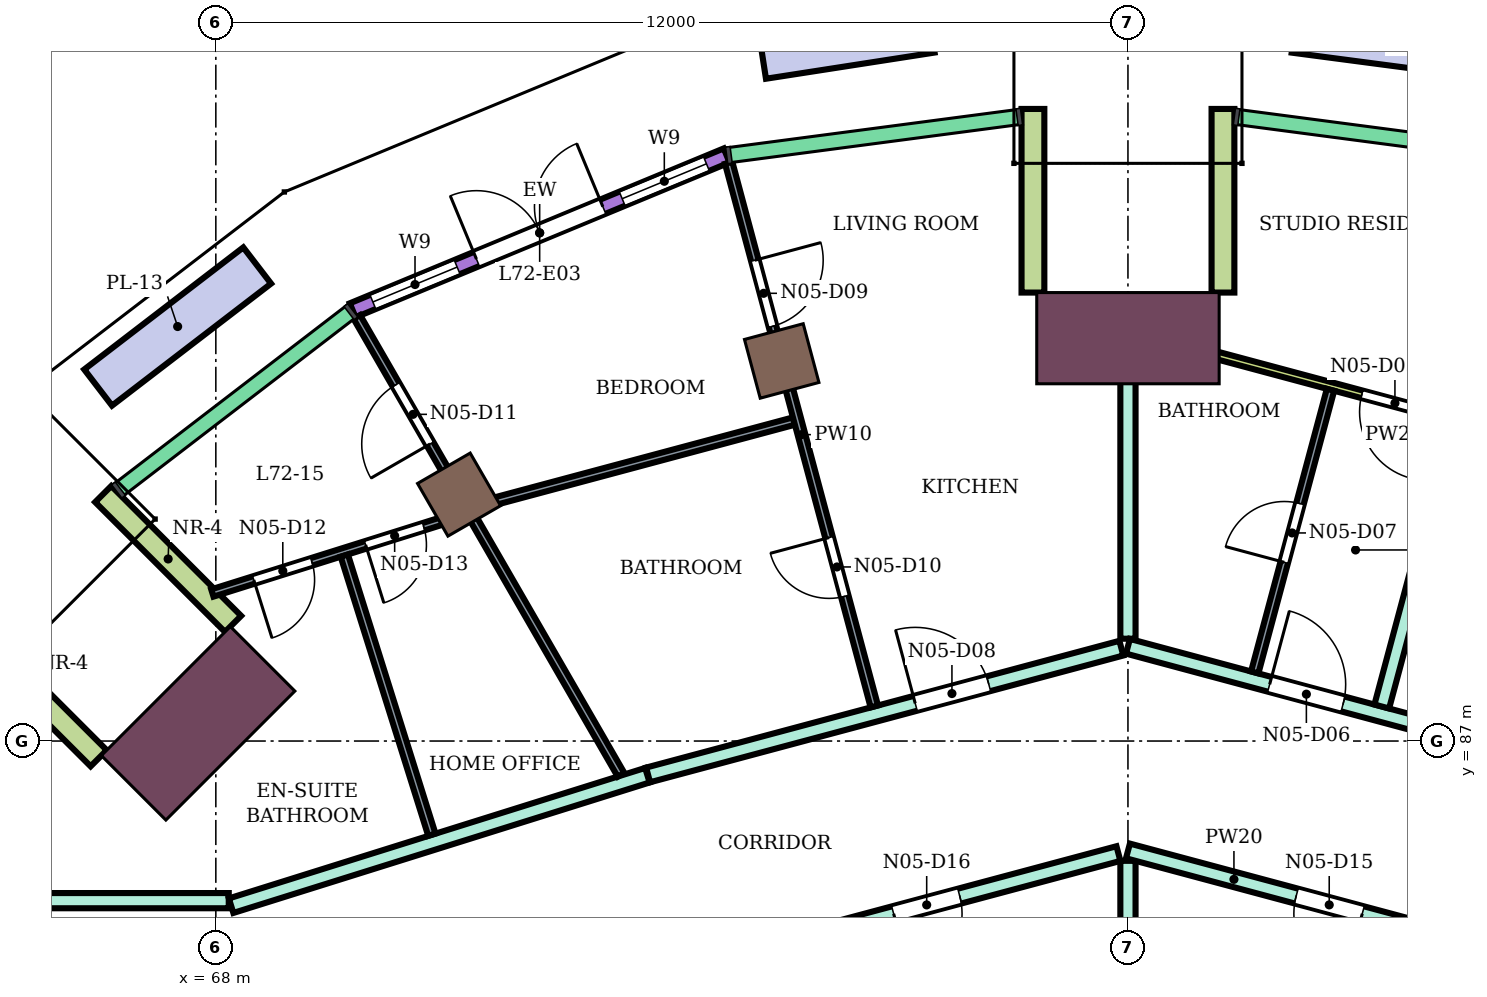
"""IFC4 building model, lengths in metres.
Left out: names, types, materials, properties, quantities, classifications, styles, units other than length and angle.
Written with IfcOpenShell. Run it as: python <this file> out.ifc"""

import sys

from ifc_helpers import new_model, si_unit, direction, frame, frame_2d, origin, origin_2d, place, context, subcontext, project, spatial, rectangle, extrude, element, fill, save


model = new_model("IFC4")
c1 = context("Model", 3, precision=1e-05, world=origin(), true_north=direction((0.0, 1.0)))
c2 = subcontext(c1, "Body", "Model", "MODEL_VIEW")
j1 = project(units=[si_unit("LENGTHUNIT", "METRE"), si_unit("PLANEANGLEUNIT", "RADIAN")], contexts=[c1])
p1 = place(None, origin())
s1 = spatial("IfcSite", under=j1, at=p1, CompositionType="ELEMENT")
p2 = place(p1, origin())
s2 = spatial("IfcBuilding", under=s1, at=p2, CompositionType="ELEMENT")
p3 = place(p2, frame((0.0, 0.0, 314.9)))
s3 = spatial("IfcBuildingStorey", under=s2, at=p3, CompositionType="ELEMENT", Elevation=314.9)
for number, where, z_axis, x_axis in (
    (1, (75.445, 92.0, 0.0), (0.0, 0.0, 1.0), (-0.259, 0.966, 0.0)),
    (2, (71.2, 90.242, 0.0), (0.0, 0.0, 1.0), (-0.5, 0.866, 0.0)),
):
    element("IfcColumn", number, at=place(p3, frame(where, z_axis=z_axis, x_axis=x_axis)), inside=s3, PredefinedType="COLUMN", context=c2, shape_type="SweptSolid", body=[
        extrude(rectangle(XDim=0.8, YDim=0.8, at=origin_2d()), origin(), (0.0, 0.0, 1.0), 4.4),
    ])
for number, where, z_axis, x_axis in (
    (3, (80.0, 92.3, 0.0), (0.0, 0.0, 1.0), (0.0, 1.0, 0.0)),
    (4, (67.767, 87.233, 0.0), (0.0, 0.0, 1.0), (-0.707, 0.707, 0.0)),
):
    element("IfcColumn", number, at=place(p3, frame(where, z_axis=z_axis, x_axis=x_axis)), inside=s3, PredefinedType="COLUMN", context=c2, shape_type="SweptSolid", body=[
        extrude(rectangle(XDim=1.2, YDim=2.4, at=origin_2d()), origin(), (0.0, 0.0, 1.0), 4.4),
    ])
p4 = place(p3, frame((74.72, 94.704, 0.0), z_axis=(0.0, 0.0, 1.0), x_axis=(-0.923876574156, -0.382690574388, 0.0)))
e5 = element("IfcWall", 5, at=p4, inside=s3, PredefinedType="NOTDEFINED", context=c2, shape_type="SweptSolid", body=[
    extrude(rectangle(XDim=5.325, YDim=0.2, at=frame_2d((2.663, 0.0))), origin(), (0.0, 0.0, 1.0), 4.4),
])
p5 = place(p4, frame((0.288, 0.0, 0.9)))
e6 = element("IfcOpeningElement", 6, at=p5, cuts=e5, PredefinedType="OPENING", context=c2, shape_type="SweptSolid", body=[
    extrude(rectangle(XDim=1.2, YDim=2.7, at=frame_2d((0.6, 1.35))), frame((0.0, 0.11, 0.0), z_axis=(0.0, -1.0, 0.0), x_axis=(1.0, 0.0, 0.0)), (0.0, 0.0, 1.0), 0.22),
])
p6 = place(p4, frame((1.763, 0.0, 0.0)))
e7 = element("IfcOpeningElement", 7, at=p6, cuts=e5, PredefinedType="OPENING", context=c2, shape_type="SweptSolid", body=[
    extrude(rectangle(XDim=1.8, YDim=2.7, at=frame_2d((0.9, 1.35))), frame((0.0, 0.11, 0.0), z_axis=(0.0, -1.0, 0.0), x_axis=(1.0, 0.0, 0.0)), (0.0, 0.0, 1.0), 0.22),
])
p7 = place(p4, frame((3.838, 0.0, 0.9)))
e8 = element("IfcOpeningElement", 8, at=p7, cuts=e5, PredefinedType="OPENING", context=c2, shape_type="SweptSolid", body=[
    extrude(rectangle(XDim=1.2, YDim=2.7, at=frame_2d((0.6, 1.35))), frame((0.0, 0.11, 0.0), z_axis=(0.0, -1.0, 0.0), x_axis=(1.0, 0.0, 0.0)), (0.0, 0.0, 1.0), 0.22),
])
for number, where, z_axis, x_axis in (
    (9, (81.25, 92.9, 0.0), (0.0, 0.0, 1.0), (0.0, 1.0, 0.0)),
    (10, (78.75, 92.9, 0.0), (0.0, 0.0, 1.0), (0.0, 1.0, 0.0)),
    (11, (68.227, 88.541, 0.0), (0.0, 0.0, 1.0), (-0.707, 0.707, 0.0)),
    (12, (66.459, 86.773, 0.0), (0.0, 0.0, 1.0), (-0.707, 0.707, 0.0)),
):
    element("IfcWall", number, at=place(p3, frame(where, z_axis=z_axis, x_axis=x_axis)), inside=s3, PredefinedType="NOTDEFINED", context=c2, shape_type="SweptSolid", body=[
        extrude(rectangle(XDim=2.416, YDim=0.3, at=frame_2d((1.208, 0.0))), origin(), (0.0, 0.0, 1.0), 4.4),
    ])
p8 = place(p3, frame((84.808, 96.01, 0.0), z_axis=(0.0, 0.0, 1.0), x_axis=(-0.991436014481, 0.130593373453, 0.0)))
e13 = element("IfcWall", 13, at=p8, inside=s3, PredefinedType="USERDEFINED", context=c2, shape_type="SweptSolid", body=[
    extrude(rectangle(XDim=2.638, YDim=0.6, at=frame_2d((1.319, 0.0))), origin(), (0.0, 0.0, 1.0), 0.6),
])
p9 = place(p3, frame((77.41, 96.354, 0.0), z_axis=(0.0, 0.0, 1.0), x_axis=(-0.988158273159, -0.153438023927, 0.0)))
e14 = element("IfcWall", 14, at=p9, inside=s3, PredefinedType="USERDEFINED", context=c2, shape_type="SweptSolid", body=[
    extrude(rectangle(XDim=2.245, YDim=0.6, at=frame_2d((1.123, 0.0))), origin(), (0.0, 0.0, 1.0), 0.6),
])
p10 = place(p3, frame((68.544, 93.256, 0.0), z_axis=(0.0, 0.0, 1.0), x_axis=(-0.793376894156, -0.608730731785, 0.0)))
e15 = element("IfcWall", 15, at=p10, inside=s3, PredefinedType="USERDEFINED", context=c2, shape_type="SweptSolid", body=[
    extrude(rectangle(XDim=2.638, YDim=0.6, at=frame_2d((1.319, 0.0))), origin(), (0.0, 0.0, 1.0), 0.6),
])
p11 = place(p3, frame((65.2, 84.9, 0.0), z_axis=(0.0, 0.0, 1.0), x_axis=(1.0, 0.0, 0.0)))
e16 = element("IfcWall", 16, at=p11, inside=s3, PredefinedType="PARTITIONING", context=c2, shape_type="SweptSolid", body=[
    extrude(rectangle(XDim=2.97, YDim=0.2, at=frame_2d((1.485, 0.0))), origin(), (0.0, 0.0, 1.0), 3.95),
])
p12 = place(p3, frame((68.201, 84.834, 0.0), z_axis=(0.0, 0.0, 1.0), x_axis=(0.954232917497, 0.29906443982, 0.0)))
e17 = element("IfcWall", 17, at=p12, inside=s3, PredefinedType="PARTITIONING", context=c2, shape_type="SweptSolid", body=[
    extrude(rectangle(XDim=5.74, YDim=0.2, at=frame_2d((2.87, 0.0))), origin(), (0.0, 0.0, 1.0), 3.95),
])
p13 = place(p3, frame((73.687, 86.554, 0.0), z_axis=(0.0, 0.0, 1.0), x_axis=(0.96595903825, 0.258695064551, 0.0)))
e18 = element("IfcWall", 18, at=p13, inside=s3, PredefinedType="PARTITIONING", context=c2, shape_type="SweptSolid", body=[
    extrude(rectangle(XDim=6.446, YDim=0.2, at=frame_2d((3.223, 0.0))), origin(), (0.0, 0.0, 1.0), 3.95),
])
p14 = place(p13, frame((3.638, 0.0, 0.0)))
e19 = element("IfcOpeningElement", 19, at=p14, cuts=e18, PredefinedType="OPENING", context=c2, shape_type="SweptSolid", body=[
    extrude(rectangle(XDim=1.0, YDim=2.1, at=frame_2d((0.5, 1.05))), frame((0.0, 0.11, 0.0), z_axis=(0.0, -1.0, 0.0), x_axis=(1.0, 0.0, 0.0)), (0.0, 0.0, 1.0), 0.22),
])
p15 = place(p3, frame((74.413, 84.057, 0.0), z_axis=(0.0, 0.0, 1.0), x_axis=(0.965972135939, 0.258646153246, 0.0)))
e20 = element("IfcWall", 20, at=p15, inside=s3, PredefinedType="PARTITIONING", context=c2, shape_type="SweptSolid", body=[
    extrude(rectangle(XDim=5.654, YDim=0.2, at=frame_2d((2.827, 0.0))), origin(), (0.0, 0.0, 1.0), 3.95),
])
p16 = place(p15, frame((2.593, 0.0, 0.0)))
e21 = element("IfcOpeningElement", 21, at=p16, cuts=e20, PredefinedType="OPENING", context=c2, shape_type="SweptSolid", body=[
    extrude(rectangle(XDim=0.9, YDim=2.1, at=frame_2d((0.45, 1.05))), frame((0.0, 0.11, 0.0), z_axis=(0.0, -1.0, 0.0), x_axis=(1.0, 0.0, 0.0)), (0.0, 0.0, 1.0), 0.22),
])
p17 = place(p3, frame((80.0, 82.699, 0.0), z_axis=(0.0, 0.0, 1.0), x_axis=(0.0, 1.0, 0.0)))
e22 = element("IfcWall", 22, at=p17, inside=s3, PredefinedType="PARTITIONING", context=c2, shape_type="SweptSolid", body=[
    extrude(rectangle(XDim=2.725, YDim=0.2, at=frame_2d((1.363, 0.0))), origin(), (0.0, 0.0, 1.0), 3.95),
])
p18 = place(p3, frame((80.0, 85.554, 0.0), z_axis=(0.0, 0.0, 1.0), x_axis=(0.965928989968, -0.258807237802, 0.0)))
e23 = element("IfcWall", 23, at=p18, inside=s3, PredefinedType="PARTITIONING", context=c2, shape_type="SweptSolid", body=[
    extrude(rectangle(XDim=5.774, YDim=0.2, at=frame_2d((2.887, 0.0))), origin(), (0.0, 0.0, 1.0), 3.95),
])
p19 = place(p18, frame((2.292, 0.0, 0.0)))
e24 = element("IfcOpeningElement", 24, at=p19, cuts=e23, PredefinedType="OPENING", context=c2, shape_type="SweptSolid", body=[
    extrude(rectangle(XDim=0.9, YDim=2.1, at=frame_2d((0.45, 1.05))), frame((0.0, 0.11, 0.0), z_axis=(0.0, -1.0, 0.0), x_axis=(1.0, 0.0, 0.0)), (0.0, 0.0, 1.0), 0.22),
])
p20 = place(p3, frame((80.0, 88.346, 0.0), z_axis=(0.0, 0.0, 1.0), x_axis=(0.0, 1.0, 0.0)))
e25 = element("IfcWall", 25, at=p20, inside=s3, PredefinedType="PARTITIONING", context=c2, shape_type="SweptSolid", body=[
    extrude(rectangle(XDim=4.354, YDim=0.2, at=frame_2d((2.177, 0.0))), origin(), (0.0, 0.0, 1.0), 3.95),
])
p21 = place(p3, frame((80.0, 88.247, 0.0), z_axis=(0.0, 0.0, 1.0), x_axis=(0.965807659316, -0.259259648244, 0.0)))
e26 = element("IfcWall", 26, at=p21, inside=s3, PredefinedType="PARTITIONING", context=c2, shape_type="SweptSolid", body=[
    extrude(rectangle(XDim=6.526, YDim=0.2, at=frame_2d((3.263, 0.0))), origin(), (0.0, 0.0, 1.0), 3.95),
])
p22 = place(p21, frame((1.93, 0.0, 0.0)))
e27 = element("IfcOpeningElement", 27, at=p22, cuts=e26, PredefinedType="OPENING", context=c2, shape_type="SweptSolid", body=[
    extrude(rectangle(XDim=1.0, YDim=2.1, at=frame_2d((0.5, 1.05))), frame((0.0, 0.11, 0.0), z_axis=(0.0, -1.0, 0.0), x_axis=(1.0, 0.0, 0.0)), (0.0, 0.0, 1.0), 0.22),
])
p23 = place(p3, frame((83.339, 87.455, 0.0), z_axis=(0.0, 0.0, 1.0), x_axis=(0.258957498737, 0.965888717114, 0.0)))
e28 = element("IfcWall", 28, at=p23, inside=s3, PredefinedType="PARTITIONING", context=c2, shape_type="SweptSolid", body=[
    extrude(rectangle(XDim=7.404, YDim=0.2, at=frame_2d((3.702, 0.0))), origin(), (0.0, 0.0, 1.0), 3.95),
])
p24 = place(p3, frame((67.954, 88.948, 0.0), z_axis=(0.0, 0.0, 1.0), x_axis=(0.954122535632, 0.299416410704, 0.0)))
e29 = element("IfcWall", 29, at=p24, inside=s3, PredefinedType="PARTITIONING", context=c2, shape_type="SweptSolid", body=[
    extrude(rectangle(XDim=3.482, YDim=0.1, at=frame_2d((1.741, 0.0))), origin(), (0.0, 0.0, 1.0), 3.95),
])
p25 = place(p24, frame((0.571, 0.0, 0.0)))
e30 = element("IfcOpeningElement", 30, at=p25, cuts=e29, PredefinedType="OPENING", context=c2, shape_type="SweptSolid", body=[
    extrude(rectangle(XDim=0.8, YDim=2.1, at=frame_2d((0.4, 1.05))), frame((0.0, 0.06, 0.0), z_axis=(0.0, -1.0, 0.0), x_axis=(1.0, 0.0, 0.0)), (0.0, 0.0, 1.0), 0.12),
])
p26 = place(p24, frame((2.114, 0.0, 0.0)))
e31 = element("IfcOpeningElement", 31, at=p26, cuts=e29, PredefinedType="OPENING", context=c2, shape_type="SweptSolid", body=[
    extrude(rectangle(XDim=0.8, YDim=2.1, at=frame_2d((0.4, 1.05))), frame((0.0, 0.06, 0.0), z_axis=(0.0, -1.0, 0.0), x_axis=(1.0, 0.0, 0.0)), (0.0, 0.0, 1.0), 0.12),
])
p27 = place(p3, frame((69.69, 89.44, 0.0), z_axis=(0.0, 0.0, 1.0), x_axis=(0.299260814267, -0.954171349939, 0.0)))
e32 = element("IfcWall", 32, at=p27, inside=s3, PredefinedType="PARTITIONING", context=c2, shape_type="SweptSolid", body=[
    extrude(rectangle(XDim=3.849, YDim=0.1, at=frame_2d((1.925, 0.0))), origin(), (0.0, 0.0, 1.0), 3.95),
])
p28 = place(p3, frame((69.855, 92.579, 0.0), z_axis=(0.0, 0.0, 1.0), x_axis=(0.499801463163, -0.866139998742, 0.0)))
e33 = element("IfcWall", 33, at=p28, inside=s3, PredefinedType="PARTITIONING", context=c2, shape_type="SweptSolid", body=[
    extrude(rectangle(XDim=6.955, YDim=0.1, at=frame_2d((3.478, 0.0))), origin(), (0.0, 0.0, 1.0), 3.95),
])
p29 = place(p28, frame((1.029, 0.0, 0.0)))
e34 = element("IfcOpeningElement", 34, at=p29, cuts=e33, PredefinedType="OPENING", context=c2, shape_type="SweptSolid", body=[
    extrude(rectangle(XDim=0.9, YDim=2.1, at=frame_2d((0.45, 1.05))), frame((0.0, 0.06, 0.0), z_axis=(0.0, -1.0, 0.0), x_axis=(1.0, 0.0, 0.0)), (0.0, 0.0, 1.0), 0.12),
])
p30 = place(p3, frame((71.375, 90.075, 0.0), z_axis=(0.0, 0.0, 1.0), x_axis=(0.965918685896, 0.258845691944, 0.0)))
e35 = element("IfcWall", 35, at=p30, inside=s3, PredefinedType="PARTITIONING", context=c2, shape_type="SweptSolid", body=[
    extrude(rectangle(XDim=4.379, YDim=0.1, at=frame_2d((2.189, 0.0))), origin(), (0.0, 0.0, 1.0), 3.95),
])
p31 = place(p3, frame((74.747, 94.607, 0.0), z_axis=(0.0, 0.0, 1.0), x_axis=(0.258787180783, -0.965934363745, 0.0)))
e36 = element("IfcWall", 36, at=p31, inside=s3, PredefinedType="PARTITIONING", context=c2, shape_type="SweptSolid", body=[
    extrude(rectangle(XDim=7.404, YDim=0.1, at=frame_2d((3.702, 0.0))), origin(), (0.0, 0.0, 1.0), 3.95),
])
p32 = place(p31, frame((1.327, 0.0, 0.0)))
e37 = element("IfcOpeningElement", 37, at=p32, cuts=e36, PredefinedType="OPENING", context=c2, shape_type="SweptSolid", body=[
    extrude(rectangle(XDim=0.9, YDim=2.1, at=frame_2d((0.45, 1.05))), frame((0.0, 0.06, 0.0), z_axis=(0.0, -1.0, 0.0), x_axis=(1.0, 0.0, 0.0)), (0.0, 0.0, 1.0), 0.12),
])
p33 = place(p31, frame((5.104, 0.0, 0.0)))
e38 = element("IfcOpeningElement", 38, at=p33, cuts=e36, PredefinedType="OPENING", context=c2, shape_type="SweptSolid", body=[
    extrude(rectangle(XDim=0.8, YDim=2.1, at=frame_2d((0.4, 1.05))), frame((0.0, 0.06, 0.0), z_axis=(0.0, -1.0, 0.0), x_axis=(1.0, 0.0, 0.0)), (0.0, 0.0, 1.0), 0.12),
])
p34 = place(p3, frame((80.106, 92.359, 0.0), z_axis=(0.0, 0.0, 1.0), x_axis=(0.965889909151, -0.258953052501, 0.0)))
e39 = element("IfcWall", 39, at=p34, inside=s3, PredefinedType="PARTITIONING", context=c2, shape_type="SweptSolid", body=[
    extrude(rectangle(XDim=8.83, YDim=0.1, at=frame_2d((4.415, 0.0))), origin(), (0.0, 0.0, 1.0), 3.28),
])
p35 = place(p34, frame((3.076, 0.0, 0.0)))
e40 = element("IfcOpeningElement", 40, at=p35, cuts=e39, PredefinedType="OPENING", context=c2, shape_type="SweptSolid", body=[
    extrude(rectangle(XDim=0.9, YDim=2.1, at=frame_2d((0.45, 1.05))), frame((0.0, 0.06, 0.0), z_axis=(0.0, -1.0, 0.0), x_axis=(1.0, 0.0, 0.0)), (0.0, 0.0, 1.0), 0.12),
])
p36 = place(p3, frame((81.668, 87.903, 0.0), z_axis=(0.0, 0.0, 1.0), x_axis=(0.259020336752, 0.965871867873, 0.0)))
e41 = element("IfcWall", 41, at=p36, inside=s3, PredefinedType="PARTITIONING", context=c2, shape_type="SweptSolid", body=[
    extrude(rectangle(XDim=3.849, YDim=0.1, at=frame_2d((1.925, 0.0))), origin(), (0.0, 0.0, 1.0), 3.95),
])
p37 = place(p36, frame((1.5, 0.0, 0.0)))
e42 = element("IfcOpeningElement", 42, at=p37, cuts=e41, PredefinedType="OPENING", context=c2, shape_type="SweptSolid", body=[
    extrude(rectangle(XDim=0.8, YDim=2.1, at=frame_2d((0.4, 1.05))), frame((0.0, 0.06, 0.0), z_axis=(0.0, -1.0, 0.0), x_axis=(1.0, 0.0, 0.0)), (0.0, 0.0, 1.0), 0.12),
])
p38 = place(p5, origin())
e43 = element("IfcWindow", 43, at=p38, inside=s3, PartitioningType="SINGLE_PANEL", PredefinedType="WINDOW", context=c2, shape_type="SweptSolid", body=[
    extrude(rectangle(XDim=1.2, YDim=2.7, at=frame_2d((0.6, 1.35))), frame((0.0, 0.03, 0.0), z_axis=(0.0, -1.0, 0.0), x_axis=(1.0, 0.0, 0.0)), (0.0, 0.0, 1.0), 0.06),
])
fill(e6, e43)
p39 = place(p6, frame((1.8, 0.0, 0.0), z_axis=(0.0, 0.0, 1.0), x_axis=(-1.0, 0.0, 0.0)))
e44 = element("IfcDoor", 44, at=p39, inside=s3, OperationType="DOUBLE_DOOR_SINGLE_SWING", PredefinedType="DOOR", context=c2, shape_type="SweptSolid", body=[
    extrude(rectangle(XDim=1.8, YDim=2.7, at=frame_2d((0.9, 1.35))), frame((0.0, 0.025, 0.0), z_axis=(0.0, -1.0, 0.0), x_axis=(1.0, 0.0, 0.0)), (0.0, 0.0, 1.0), 0.05),
])
fill(e7, e44)
p40 = place(p7, origin())
e45 = element("IfcWindow", 45, at=p40, inside=s3, PartitioningType="SINGLE_PANEL", PredefinedType="WINDOW", context=c2, shape_type="SweptSolid", body=[
    extrude(rectangle(XDim=1.2, YDim=2.7, at=frame_2d((0.6, 1.35))), frame((0.0, 0.03, 0.0), z_axis=(0.0, -1.0, 0.0), x_axis=(1.0, 0.0, 0.0)), (0.0, 0.0, 1.0), 0.06),
])
fill(e8, e45)
p41 = place(p35, frame((0.9, 0.0, 0.0), z_axis=(0.0, 0.0, 1.0), x_axis=(-1.0, 0.0, 0.0)))
e46 = element("IfcDoor", 46, at=p41, inside=s3, OperationType="SINGLE_SWING_LEFT", PredefinedType="DOOR", context=c2, shape_type="SweptSolid", body=[
    extrude(rectangle(XDim=0.9, YDim=2.1, at=frame_2d((0.45, 1.05))), frame((0.0, 0.025, 0.0), z_axis=(0.0, -1.0, 0.0), x_axis=(1.0, 0.0, 0.0)), (0.0, 0.0, 1.0), 0.05),
])
fill(e40, e46)
p42 = place(p22, origin())
e47 = element("IfcDoor", 47, at=p42, inside=s3, OperationType="SINGLE_SWING_LEFT", PredefinedType="DOOR", context=c2, shape_type="SweptSolid", body=[
    extrude(rectangle(XDim=1.0, YDim=2.1, at=frame_2d((0.5, 1.05))), frame((0.0, 0.025, 0.0), z_axis=(0.0, -1.0, 0.0), x_axis=(1.0, 0.0, 0.0)), (0.0, 0.0, 1.0), 0.05),
])
fill(e27, e47)
p43 = place(p37, origin())
e48 = element("IfcDoor", 48, at=p43, inside=s3, OperationType="SINGLE_SWING_LEFT", PredefinedType="DOOR", context=c2, shape_type="SweptSolid", body=[
    extrude(rectangle(XDim=0.8, YDim=2.1, at=frame_2d((0.4, 1.05))), frame((0.0, 0.025, 0.0), z_axis=(0.0, -1.0, 0.0), x_axis=(1.0, 0.0, 0.0)), (0.0, 0.0, 1.0), 0.05),
])
fill(e42, e48)
p44 = place(p14, origin())
e49 = element("IfcDoor", 49, at=p44, inside=s3, OperationType="SINGLE_SWING_LEFT", PredefinedType="DOOR", context=c2, shape_type="SweptSolid", body=[
    extrude(rectangle(XDim=1.0, YDim=2.1, at=frame_2d((0.5, 1.05))), frame((0.0, 0.025, 0.0), z_axis=(0.0, -1.0, 0.0), x_axis=(1.0, 0.0, 0.0)), (0.0, 0.0, 1.0), 0.05),
])
fill(e19, e49)
p45 = place(p32, origin())
e50 = element("IfcDoor", 50, at=p45, inside=s3, OperationType="SINGLE_SWING_LEFT", PredefinedType="DOOR", context=c2, shape_type="SweptSolid", body=[
    extrude(rectangle(XDim=0.9, YDim=2.1, at=frame_2d((0.45, 1.05))), frame((0.0, 0.025, 0.0), z_axis=(0.0, -1.0, 0.0), x_axis=(1.0, 0.0, 0.0)), (0.0, 0.0, 1.0), 0.05),
])
fill(e37, e50)
p46 = place(p33, frame((0.8, 0.0, 0.0), z_axis=(0.0, 0.0, 1.0), x_axis=(-1.0, 0.0, 0.0)))
e51 = element("IfcDoor", 51, at=p46, inside=s3, OperationType="SINGLE_SWING_RIGHT", PredefinedType="DOOR", context=c2, shape_type="SweptSolid", body=[
    extrude(rectangle(XDim=0.8, YDim=2.1, at=frame_2d((0.4, 1.05))), frame((0.0, 0.025, 0.0), z_axis=(0.0, -1.0, 0.0), x_axis=(1.0, 0.0, 0.0)), (0.0, 0.0, 1.0), 0.05),
])
fill(e38, e51)
p47 = place(p29, frame((0.9, 0.0, 0.0), z_axis=(0.0, 0.0, 1.0), x_axis=(-1.0, 0.0, 0.0)))
e52 = element("IfcDoor", 52, at=p47, inside=s3, OperationType="SINGLE_SWING_LEFT", PredefinedType="DOOR", context=c2, shape_type="SweptSolid", body=[
    extrude(rectangle(XDim=0.9, YDim=2.1, at=frame_2d((0.45, 1.05))), frame((0.0, 0.025, 0.0), z_axis=(0.0, -1.0, 0.0), x_axis=(1.0, 0.0, 0.0)), (0.0, 0.0, 1.0), 0.05),
])
fill(e34, e52)
p48 = place(p25, frame((0.8, 0.0, 0.0), z_axis=(0.0, 0.0, 1.0), x_axis=(-1.0, 0.0, 0.0)))
e53 = element("IfcDoor", 53, at=p48, inside=s3, OperationType="SINGLE_SWING_RIGHT", PredefinedType="DOOR", context=c2, shape_type="SweptSolid", body=[
    extrude(rectangle(XDim=0.8, YDim=2.1, at=frame_2d((0.4, 1.05))), frame((0.0, 0.025, 0.0), z_axis=(0.0, -1.0, 0.0), x_axis=(1.0, 0.0, 0.0)), (0.0, 0.0, 1.0), 0.05),
])
fill(e30, e53)
p49 = place(p26, frame((0.8, 0.0, 0.0), z_axis=(0.0, 0.0, 1.0), x_axis=(-1.0, 0.0, 0.0)))
e54 = element("IfcDoor", 54, at=p49, inside=s3, OperationType="SINGLE_SWING_RIGHT", PredefinedType="DOOR", context=c2, shape_type="SweptSolid", body=[
    extrude(rectangle(XDim=0.8, YDim=2.1, at=frame_2d((0.4, 1.05))), frame((0.0, 0.025, 0.0), z_axis=(0.0, -1.0, 0.0), x_axis=(1.0, 0.0, 0.0)), (0.0, 0.0, 1.0), 0.05),
])
fill(e31, e54)
p50 = place(p19, frame((0.9, 0.0, 0.0), z_axis=(0.0, 0.0, 1.0), x_axis=(-1.0, 0.0, 0.0)))
e55 = element("IfcDoor", 55, at=p50, inside=s3, OperationType="SINGLE_SWING_LEFT", PredefinedType="DOOR", context=c2, shape_type="SweptSolid", body=[
    extrude(rectangle(XDim=0.9, YDim=2.1, at=frame_2d((0.45, 1.05))), frame((0.0, 0.025, 0.0), z_axis=(0.0, -1.0, 0.0), x_axis=(1.0, 0.0, 0.0)), (0.0, 0.0, 1.0), 0.05),
])
fill(e24, e55)
p51 = place(p16, frame((0.9, 0.0, 0.0), z_axis=(0.0, 0.0, 1.0), x_axis=(-1.0, 0.0, 0.0)))
e56 = element("IfcDoor", 56, at=p51, inside=s3, OperationType="SINGLE_SWING_RIGHT", PredefinedType="DOOR", context=c2, shape_type="SweptSolid", body=[
    extrude(rectangle(XDim=0.9, YDim=2.1, at=frame_2d((0.45, 1.05))), frame((0.0, 0.025, 0.0), z_axis=(0.0, -1.0, 0.0), x_axis=(1.0, 0.0, 0.0)), (0.0, 0.0, 1.0), 0.05),
])
fill(e21, e56)
save(model, sys.argv[1])
